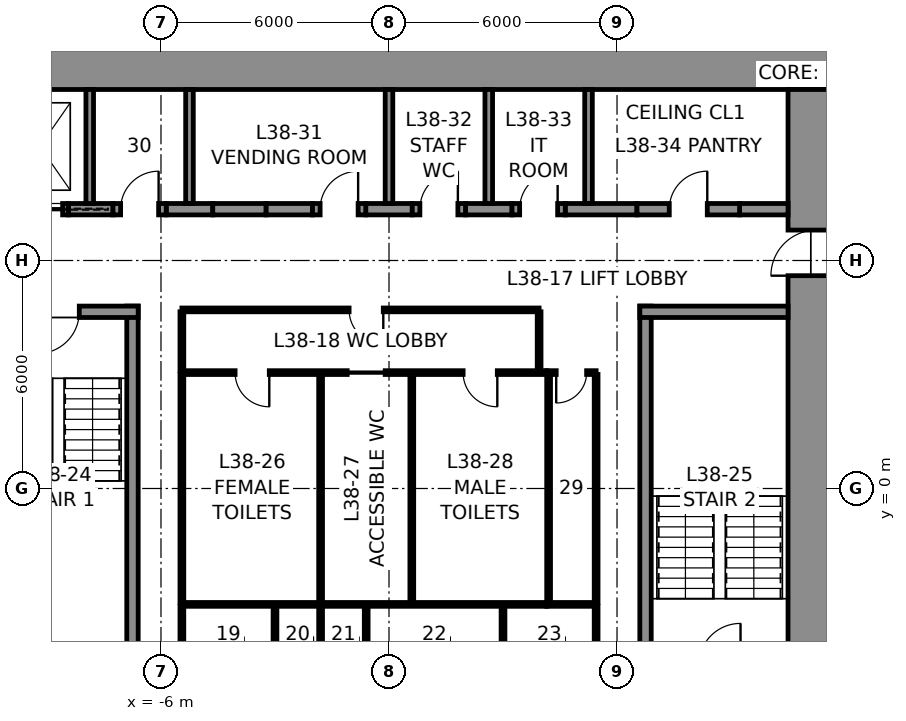
"""IFC4 building model, lengths in metres.
Left out: names, types, materials, properties, quantities, classifications, styles, units other than length and angle.
Written with IfcOpenShell. Run it as: python <this file> out.ifc"""

import sys

from ifc_helpers import new_model, si_unit, direction, frame, frame_2d, origin, place, context, subcontext, project, spatial, rectangle, extrude, element, fill, save


model = new_model("IFC4")
c1 = context("Model", 3, precision=1e-05, world=origin(), true_north=direction((0.0, 1.0)))
c2 = subcontext(c1, "Body", "Model", "MODEL_VIEW")
j1 = project(units=[si_unit("LENGTHUNIT", "METRE"), si_unit("PLANEANGLEUNIT", "RADIAN")], contexts=[c1])
p1 = place(None, origin())
s1 = spatial("IfcSite", under=j1, at=p1, CompositionType="ELEMENT")
p2 = place(p1, origin())
s2 = spatial("IfcBuilding", under=s1, at=p2, CompositionType="ELEMENT")
p3 = place(p2, frame((0.0, 0.0, 179.8)))
s3 = spatial("IfcBuildingStorey", under=s2, at=p3, CompositionType="ELEMENT", Elevation=179.8)
p4 = place(p3, frame((-12.0, 11.25, 0.0), z_axis=(0.0, 0.0, 1.0), x_axis=(1.0, 0.0, 0.0)))
e1 = element("IfcWall", 1, at=p4, inside=s3, PredefinedType="SHEAR", context=c2, shape_type="SweptSolid", body=[
    extrude(rectangle(XDim=24.0, YDim=1.5, at=frame_2d((12.0, 0.0))), origin(), (0.0, 0.0, 1.0), 4.0),
])
p5 = place(p3, frame((11.25, 10.5, 0.0), z_axis=(0.0, 0.0, 1.0), x_axis=(0.0, -1.0, 0.0)))
e2 = element("IfcWall", 2, at=p5, inside=s3, PredefinedType="SHEAR", context=c2, shape_type="SweptSolid", body=[
    extrude(rectangle(XDim=21.0, YDim=1.5, at=frame_2d((10.5, 0.0))), origin(), (0.0, 0.0, 1.0), 4.0),
])
p6 = place(p5, frame((3.7, 0.0, 0.0)))
e3 = element("IfcOpeningElement", 3, at=p6, cuts=e2, PredefinedType="OPENING", context=c2, shape_type="SweptSolid", body=[
    extrude(rectangle(XDim=1.2, YDim=2.3, at=frame_2d((0.6, 1.15))), frame((0.0, 0.76, 0.0), z_axis=(0.0, -1.0, 0.0), x_axis=(1.0, 0.0, 0.0)), (0.0, 0.0, 1.0), 1.52),
])
p7 = place(p5, frame((16.1, 0.0, 0.0)))
e4 = element("IfcOpeningElement", 4, at=p7, cuts=e2, PredefinedType="OPENING", context=c2, shape_type="SweptSolid", body=[
    extrude(rectangle(XDim=1.2, YDim=2.3, at=frame_2d((0.6, 1.15))), frame((0.0, 0.76, 0.0), z_axis=(0.0, -1.0, 0.0), x_axis=(1.0, 0.0, 0.0)), (0.0, 0.0, 1.0), 1.52),
])
p8 = place(p3, frame((-8.438, 7.35, 0.0), z_axis=(0.0, 0.0, 1.0), x_axis=(1.0, 0.0, 0.0)))
e5 = element("IfcWall", 5, at=p8, inside=s3, PredefinedType="SHEAR", context=c2, shape_type="SweptSolid", body=[
    extrude(rectangle(XDim=1.175, YDim=0.3, at=frame_2d((0.587, 0.0))), origin(), (0.0, 0.0, 1.0), 4.0),
])
for number, where, z_axis, x_axis in (
    (6, (-5.863, 7.35, 0.0), (0.0, 0.0, 1.0), (1.0, 0.0, 0.0)),
    (7, (-3.238, 7.35, 0.0), (0.0, 0.0, 1.0), (1.0, 0.0, 0.0)),
    (8, (-0.613, 7.35, 0.0), (0.0, 0.0, 1.0), (1.0, 0.0, 0.0)),
    (9, (2.012, 7.35, 0.0), (0.0, 0.0, 1.0), (1.0, 0.0, 0.0)),
):
    element("IfcWall", number, at=place(p3, frame(where, z_axis=z_axis, x_axis=x_axis)), inside=s3, PredefinedType="SHEAR", context=c2, shape_type="SweptSolid", body=[
        extrude(rectangle(XDim=1.225, YDim=0.3, at=frame_2d((0.613, 0.0))), origin(), (0.0, 0.0, 1.0), 4.0),
    ])
p9 = place(p3, frame((4.637, 7.35, 0.0), z_axis=(0.0, 0.0, 1.0), x_axis=(1.0, 0.0, 0.0)))
e10 = element("IfcWall", 10, at=p9, inside=s3, PredefinedType="SHEAR", context=c2, shape_type="SweptSolid", body=[
    extrude(rectangle(XDim=1.887, YDim=0.3, at=frame_2d((0.944, 0.0))), origin(), (0.0, 0.0, 1.0), 4.0),
])
p10 = place(p3, frame((9.225, 7.35, 0.0), z_axis=(0.0, 0.0, 1.0), x_axis=(1.0, 0.0, 0.0)))
e11 = element("IfcWall", 11, at=p10, inside=s3, PredefinedType="SHEAR", context=c2, shape_type="SweptSolid", body=[
    extrude(rectangle(XDim=1.275, YDim=0.3, at=frame_2d((0.637, 0.0))), origin(), (0.0, 0.0, 1.0), 4.0),
])
p11 = place(p3, frame((-9.938, 7.35, 0.0), z_axis=(0.0, 0.0, 1.0), x_axis=(1.0, 0.0, 0.0)))
e12 = element("IfcWall", 12, at=p11, inside=s3, PredefinedType="PARTITIONING", context=c2, shape_type="SweptSolid", body=[
    extrude(rectangle(XDim=1.5, YDim=0.3, at=frame_2d((0.75, 0.0))), origin(), (0.0, 0.0, 1.0), 4.0),
])
p12 = place(p11, frame((0.15, 0.0, 0.0)))
e13 = element("IfcOpeningElement", 13, at=p12, cuts=e12, PredefinedType="OPENING", context=c2, shape_type="SweptSolid", body=[
    extrude(rectangle(XDim=1.2, YDim=2.3, at=frame_2d((0.6, 1.15))), frame((0.0, 0.16, 0.0), z_axis=(0.0, -1.0, 0.0), x_axis=(1.0, 0.0, 0.0)), (0.0, 0.0, 1.0), 0.32),
])
p13 = place(p3, frame((-7.262, 7.35, 0.0), z_axis=(0.0, 0.0, 1.0), x_axis=(1.0, 0.0, 0.0)))
e14 = element("IfcWall", 14, at=p13, inside=s3, PredefinedType="PARTITIONING", context=c2, shape_type="SweptSolid", body=[
    extrude(rectangle(XDim=1.4, YDim=0.3, at=frame_2d((0.7, 0.0))), origin(), (0.0, 0.0, 1.0), 4.0),
])
p14 = place(p13, frame((0.2, 0.0, 0.0)))
e15 = element("IfcOpeningElement", 15, at=p14, cuts=e14, PredefinedType="OPENING", context=c2, shape_type="SweptSolid", body=[
    extrude(rectangle(XDim=1.0, YDim=2.3, at=frame_2d((0.5, 1.15))), frame((0.0, 0.16, 0.0), z_axis=(0.0, -1.0, 0.0), x_axis=(1.0, 0.0, 0.0)), (0.0, 0.0, 1.0), 0.32),
])
p15 = place(p3, frame((-4.637, 7.35, 0.0), z_axis=(0.0, 0.0, 1.0), x_axis=(1.0, 0.0, 0.0)))
e16 = element("IfcWall", 16, at=p15, inside=s3, PredefinedType="PARTITIONING", context=c2, shape_type="SweptSolid", body=[
    extrude(rectangle(XDim=1.4, YDim=0.3, at=frame_2d((0.7, 0.0))), origin(), (0.0, 0.0, 1.0), 4.0),
])
p16 = place(p3, frame((-2.012, 7.35, 0.0), z_axis=(0.0, 0.0, 1.0), x_axis=(1.0, 0.0, 0.0)))
e17 = element("IfcWall", 17, at=p16, inside=s3, PredefinedType="PARTITIONING", context=c2, shape_type="SweptSolid", body=[
    extrude(rectangle(XDim=1.4, YDim=0.3, at=frame_2d((0.7, 0.0))), origin(), (0.0, 0.0, 1.0), 4.0),
])
p17 = place(p16, frame((0.2, 0.0, 0.0)))
e18 = element("IfcOpeningElement", 18, at=p17, cuts=e17, PredefinedType="OPENING", context=c2, shape_type="SweptSolid", body=[
    extrude(rectangle(XDim=1.0, YDim=2.3, at=frame_2d((0.5, 1.15))), frame((0.0, 0.16, 0.0), z_axis=(0.0, -1.0, 0.0), x_axis=(1.0, 0.0, 0.0)), (0.0, 0.0, 1.0), 0.32),
])
p18 = place(p3, frame((0.613, 7.35, 0.0), z_axis=(0.0, 0.0, 1.0), x_axis=(1.0, 0.0, 0.0)))
e19 = element("IfcWall", 19, at=p18, inside=s3, PredefinedType="PARTITIONING", context=c2, shape_type="SweptSolid", body=[
    extrude(rectangle(XDim=1.4, YDim=0.3, at=frame_2d((0.7, 0.0))), origin(), (0.0, 0.0, 1.0), 4.0),
])
p19 = place(p18, frame((0.2, 0.0, 0.0)))
e20 = element("IfcOpeningElement", 20, at=p19, cuts=e19, PredefinedType="OPENING", context=c2, shape_type="SweptSolid", body=[
    extrude(rectangle(XDim=1.0, YDim=2.3, at=frame_2d((0.5, 1.15))), frame((0.0, 0.16, 0.0), z_axis=(0.0, -1.0, 0.0), x_axis=(1.0, 0.0, 0.0)), (0.0, 0.0, 1.0), 0.32),
])
p20 = place(p3, frame((3.238, 7.35, 0.0), z_axis=(0.0, 0.0, 1.0), x_axis=(1.0, 0.0, 0.0)))
e21 = element("IfcWall", 21, at=p20, inside=s3, PredefinedType="PARTITIONING", context=c2, shape_type="SweptSolid", body=[
    extrude(rectangle(XDim=1.4, YDim=0.3, at=frame_2d((0.7, 0.0))), origin(), (0.0, 0.0, 1.0), 4.0),
])
p21 = place(p20, frame((0.2, 0.0, 0.0)))
e22 = element("IfcOpeningElement", 22, at=p21, cuts=e21, PredefinedType="OPENING", context=c2, shape_type="SweptSolid", body=[
    extrude(rectangle(XDim=1.0, YDim=2.3, at=frame_2d((0.5, 1.15))), frame((0.0, 0.16, 0.0), z_axis=(0.0, -1.0, 0.0), x_axis=(1.0, 0.0, 0.0)), (0.0, 0.0, 1.0), 0.32),
])
p22 = place(p3, frame((6.525, 7.35, 0.0), z_axis=(0.0, 0.0, 1.0), x_axis=(1.0, 0.0, 0.0)))
e23 = element("IfcWall", 23, at=p22, inside=s3, PredefinedType="PARTITIONING", context=c2, shape_type="SweptSolid", body=[
    extrude(rectangle(XDim=2.7, YDim=0.3, at=frame_2d((1.35, 0.0))), origin(), (0.0, 0.0, 1.0), 4.0),
])
p23 = place(p22, frame((0.85, 0.0, 0.0)))
e24 = element("IfcOpeningElement", 24, at=p23, cuts=e23, PredefinedType="OPENING", context=c2, shape_type="SweptSolid", body=[
    extrude(rectangle(XDim=1.0, YDim=2.3, at=frame_2d((0.5, 1.15))), frame((0.0, 0.16, 0.0), z_axis=(0.0, -1.0, 0.0), x_axis=(1.0, 0.0, 0.0)), (0.0, 0.0, 1.0), 0.32),
])
for number, where, z_axis, x_axis in (
    (25, (-7.875, 7.5, 0.0), (0.0, 0.0, 1.0), (0.0, 1.0, 0.0)),
    (26, (-5.25, 7.5, 0.0), (0.0, 0.0, 1.0), (0.0, 1.0, 0.0)),
    (27, (0.0, 7.5, 0.0), (0.0, 0.0, 1.0), (0.0, 1.0, 0.0)),
    (28, (2.625, 7.5, 0.0), (0.0, 0.0, 1.0), (0.0, 1.0, 0.0)),
    (29, (5.25, 7.5, 0.0), (0.0, 0.0, 1.0), (0.0, 1.0, 0.0)),
):
    element("IfcWall", number, at=place(p3, frame(where, z_axis=z_axis, x_axis=x_axis)), inside=s3, PredefinedType="PARTITIONING", context=c2, shape_type="SweptSolid", body=[
        extrude(rectangle(XDim=3.0, YDim=0.2, at=frame_2d((1.5, 0.0))), origin(), (0.0, 0.0, 1.0), 4.0),
    ])
p24 = place(p3, frame((-6.75, -4.8, 0.0), z_axis=(0.0, 0.0, 1.0), x_axis=(0.0, 1.0, 0.0)))
e30 = element("IfcWall", 30, at=p24, inside=s3, PredefinedType="SOLIDWALL", context=c2, shape_type="SweptSolid", body=[
    extrude(rectangle(XDim=9.6, YDim=0.3, at=frame_2d((4.8, 0.0))), origin(), (0.0, 0.0, 1.0), 3.75),
])
p25 = place(p3, frame((-10.5, 4.65, 0.0), z_axis=(0.0, 0.0, 1.0), x_axis=(1.0, 0.0, 0.0)))
e31 = element("IfcWall", 31, at=p25, inside=s3, PredefinedType="SOLIDWALL", context=c2, shape_type="SweptSolid", body=[
    extrude(rectangle(XDim=3.9, YDim=0.3, at=frame_2d((1.95, 0.0))), origin(), (0.0, 0.0, 1.0), 3.75),
])
p26 = place(p25, frame((1.25, 0.0, 0.0)))
e32 = element("IfcOpeningElement", 32, at=p26, cuts=e31, PredefinedType="OPENING", context=c2, shape_type="SweptSolid", body=[
    extrude(rectangle(XDim=1.1, YDim=2.3, at=frame_2d((0.55, 1.15))), frame((0.0, 0.16, 0.0), z_axis=(0.0, -1.0, 0.0), x_axis=(1.0, 0.0, 0.0)), (0.0, 0.0, 1.0), 0.32),
])
p27 = place(p3, frame((6.75, -4.8, 0.0), z_axis=(0.0, 0.0, 1.0), x_axis=(0.0, 1.0, 0.0)))
e33 = element("IfcWall", 33, at=p27, inside=s3, PredefinedType="SOLIDWALL", context=c2, shape_type="SweptSolid", body=[
    extrude(rectangle(XDim=9.6, YDim=0.3, at=frame_2d((4.8, 0.0))), origin(), (0.0, 0.0, 1.0), 3.75),
])
p28 = place(p3, frame((6.6, 4.65, 0.0), z_axis=(0.0, 0.0, 1.0), x_axis=(1.0, 0.0, 0.0)))
e34 = element("IfcWall", 34, at=p28, inside=s3, PredefinedType="SOLIDWALL", context=c2, shape_type="SweptSolid", body=[
    extrude(rectangle(XDim=3.9, YDim=0.3, at=frame_2d((1.95, 0.0))), origin(), (0.0, 0.0, 1.0), 3.75),
])
p29 = place(p3, frame((-5.45, 3.05, 0.0), z_axis=(0.0, 0.0, 1.0), x_axis=(1.0, 0.0, 0.0)))
e35 = element("IfcWall", 35, at=p29, inside=s3, PredefinedType="PARTITIONING", context=c2, shape_type="SweptSolid", body=[
    extrude(rectangle(XDim=9.6, YDim=0.1, at=frame_2d((4.8, 0.0))), origin(), (0.0, 0.0, 1.0), 3.75),
])
p30 = place(p29, frame((1.4, 0.0, 0.0)))
e36 = element("IfcOpeningElement", 36, at=p30, cuts=e35, PredefinedType="OPENING", context=c2, shape_type="SweptSolid", body=[
    extrude(rectangle(XDim=0.9, YDim=2.3, at=frame_2d((0.45, 1.15))), frame((0.0, 0.06, 0.0), z_axis=(0.0, -1.0, 0.0), x_axis=(1.0, 0.0, 0.0)), (0.0, 0.0, 1.0), 0.12),
])
p31 = place(p29, frame((4.35, 0.0, 0.0)))
e37 = element("IfcOpeningElement", 37, at=p31, cuts=e35, PredefinedType="OPENING", context=c2, shape_type="SweptSolid", body=[
    extrude(rectangle(XDim=1.0, YDim=2.3, at=frame_2d((0.5, 1.15))), frame((0.0, 0.06, 0.0), z_axis=(0.0, -1.0, 0.0), x_axis=(1.0, 0.0, 0.0)), (0.0, 0.0, 1.0), 0.12),
])
p32 = place(p29, frame((7.4, 0.0, 0.0)))
e38 = element("IfcOpeningElement", 38, at=p32, cuts=e35, PredefinedType="OPENING", context=c2, shape_type="SweptSolid", body=[
    extrude(rectangle(XDim=0.9, YDim=2.3, at=frame_2d((0.45, 1.15))), frame((0.0, 0.06, 0.0), z_axis=(0.0, -1.0, 0.0), x_axis=(1.0, 0.0, 0.0)), (0.0, 0.0, 1.0), 0.12),
])
p33 = place(p3, frame((4.15, 3.05, 0.0), z_axis=(0.0, 0.0, 1.0), x_axis=(1.0, 0.0, 0.0)))
e39 = element("IfcWall", 39, at=p33, inside=s3, PredefinedType="PARTITIONING", context=c2, shape_type="SweptSolid", body=[
    extrude(rectangle(XDim=1.3, YDim=0.1, at=frame_2d((0.65, 0.0))), origin(), (0.0, 0.0, 1.0), 3.75),
])
p34 = place(p33, frame((0.25, 0.0, 0.0)))
e40 = element("IfcOpeningElement", 40, at=p34, cuts=e39, PredefinedType="OPENING", context=c2, shape_type="SweptSolid", body=[
    extrude(rectangle(XDim=0.8, YDim=2.3, at=frame_2d((0.4, 1.15))), frame((0.0, 0.06, 0.0), z_axis=(0.0, -1.0, 0.0), x_axis=(1.0, 0.0, 0.0)), (0.0, 0.0, 1.0), 0.12),
])
p35 = place(p3, frame((4.15, -3.05, 0.0), z_axis=(0.0, 0.0, 1.0), x_axis=(-1.0, 0.0, 0.0)))
e41 = element("IfcWall", 41, at=p35, inside=s3, PredefinedType="PARTITIONING", context=c2, shape_type="SweptSolid", body=[
    extrude(rectangle(XDim=9.6, YDim=0.1, at=frame_2d((4.8, 0.0))), origin(), (0.0, 0.0, 1.0), 3.75),
])
p36 = place(p3, frame((5.45, -3.05, 0.0), z_axis=(0.0, 0.0, 1.0), x_axis=(-1.0, 0.0, 0.0)))
e42 = element("IfcWall", 42, at=p36, inside=s3, PredefinedType="PARTITIONING", context=c2, shape_type="SweptSolid", body=[
    extrude(rectangle(XDim=1.3, YDim=0.1, at=frame_2d((0.65, 0.0))), origin(), (0.0, 0.0, 1.0), 3.75),
])
for number, where, z_axis, x_axis in (
    (43, (5.45, 3.0, 0.0), (0.0, 0.0, 1.0), (0.0, -1.0, 0.0)),
    (44, (-5.45, -3.0, 0.0), (0.0, 0.0, 1.0), (0.0, 1.0, 0.0)),
    (45, (-1.8, -3.0, 0.0), (0.0, 0.0, 1.0), (0.0, 1.0, 0.0)),
    (46, (0.6, -3.0, 0.0), (0.0, 0.0, 1.0), (0.0, 1.0, 0.0)),
    (47, (4.2, -3.0, 0.0), (0.0, 0.0, 1.0), (0.0, 1.0, 0.0)),
):
    element("IfcWall", number, at=place(p3, frame(where, z_axis=z_axis, x_axis=x_axis)), inside=s3, PredefinedType="PARTITIONING", context=c2, shape_type="SweptSolid", body=[
        extrude(rectangle(XDim=6.0, YDim=0.1, at=frame_2d((3.0, 0.0))), origin(), (0.0, 0.0, 1.0), 3.75),
    ])
p37 = place(p3, frame((-5.45, 4.7, 0.0), z_axis=(0.0, 0.0, 1.0), x_axis=(1.0, 0.0, 0.0)))
e48 = element("IfcWall", 48, at=p37, inside=s3, PredefinedType="PARTITIONING", context=c2, shape_type="SweptSolid", body=[
    extrude(rectangle(XDim=9.4, YDim=0.1, at=frame_2d((4.7, 0.0))), origin(), (0.0, 0.0, 1.0), 3.75),
])
p38 = place(p37, frame((4.4, 0.0, 0.0)))
e49 = element("IfcOpeningElement", 49, at=p38, cuts=e48, PredefinedType="OPENING", context=c2, shape_type="SweptSolid", body=[
    extrude(rectangle(XDim=0.9, YDim=2.3, at=frame_2d((0.45, 1.15))), frame((0.0, 0.06, 0.0), z_axis=(0.0, -1.0, 0.0), x_axis=(1.0, 0.0, 0.0)), (0.0, 0.0, 1.0), 0.12),
])
for number, where, z_axis, x_axis in (
    (50, (-5.45, 3.1, 0.0), (0.0, 0.0, 1.0), (0.0, 1.0, 0.0)),
    (51, (3.95, 3.1, 0.0), (0.0, 0.0, 1.0), (0.0, 1.0, 0.0)),
    (52, (-5.45, -3.1, 0.0), (0.0, 0.0, 1.0), (0.0, -1.0, 0.0)),
    (53, (5.45, -3.1, 0.0), (0.0, 0.0, 1.0), (0.0, -1.0, 0.0)),
    (54, (-3.0, -3.1, 0.0), (0.0, 0.0, 1.0), (0.0, -1.0, 0.0)),
    (55, (-1.8, -3.1, 0.0), (0.0, 0.0, 1.0), (0.0, -1.0, 0.0)),
    (56, (-0.6, -3.1, 0.0), (0.0, 0.0, 1.0), (0.0, -1.0, 0.0)),
    (57, (3.0, -3.1, 0.0), (0.0, 0.0, 1.0), (0.0, -1.0, 0.0)),
):
    element("IfcWall", number, at=place(p3, frame(where, z_axis=z_axis, x_axis=x_axis)), inside=s3, PredefinedType="PARTITIONING", context=c2, shape_type="SweptSolid", body=[
        extrude(rectangle(XDim=1.55, YDim=0.1, at=frame_2d((0.775, 0.0))), origin(), (0.0, 0.0, 1.0), 3.75),
    ])
p39 = place(p26, frame((1.1, 0.0, 0.0), z_axis=(0.0, 0.0, 1.0), x_axis=(-1.0, 0.0, 0.0)))
e58 = element("IfcDoor", 58, at=p39, inside=s3, OperationType="SINGLE_SWING_RIGHT", PredefinedType="DOOR", context=c2, shape_type="SweptSolid", body=[
    extrude(rectangle(XDim=1.1, YDim=2.3, at=frame_2d((0.55, 1.15))), frame((0.0, 0.025, 0.0), z_axis=(0.0, -1.0, 0.0), x_axis=(1.0, 0.0, 0.0)), (0.0, 0.0, 1.0), 0.05),
])
fill(e32, e58)
p40 = place(p30, frame((0.9, 0.0, 0.0), z_axis=(0.0, 0.0, 1.0), x_axis=(-1.0, 0.0, 0.0)))
e59 = element("IfcDoor", 59, at=p40, inside=s3, OperationType="SINGLE_SWING_LEFT", PredefinedType="DOOR", context=c2, shape_type="SweptSolid", body=[
    extrude(rectangle(XDim=0.9, YDim=2.3, at=frame_2d((0.45, 1.15))), frame((0.0, 0.025, 0.0), z_axis=(0.0, -1.0, 0.0), x_axis=(1.0, 0.0, 0.0)), (0.0, 0.0, 1.0), 0.05),
])
fill(e36, e59)
p41 = place(p31, frame((1.0, 0.0, 0.0), z_axis=(0.0, 0.0, 1.0), x_axis=(-1.0, 0.0, 0.0)))
e60 = element("IfcDoor", 60, at=p41, inside=s3, OperationType="SLIDING_TO_LEFT", PredefinedType="DOOR", context=c2, shape_type="SweptSolid", body=[
    extrude(rectangle(XDim=1.0, YDim=2.3, at=frame_2d((0.5, 1.15))), frame((0.0, 0.025, 0.0), z_axis=(0.0, -1.0, 0.0), x_axis=(1.0, 0.0, 0.0)), (0.0, 0.0, 1.0), 0.05),
])
fill(e37, e60)
p42 = place(p32, frame((0.9, 0.0, 0.0), z_axis=(0.0, 0.0, 1.0), x_axis=(-1.0, 0.0, 0.0)))
e61 = element("IfcDoor", 61, at=p42, inside=s3, OperationType="SINGLE_SWING_LEFT", PredefinedType="DOOR", context=c2, shape_type="SweptSolid", body=[
    extrude(rectangle(XDim=0.9, YDim=2.3, at=frame_2d((0.45, 1.15))), frame((0.0, 0.025, 0.0), z_axis=(0.0, -1.0, 0.0), x_axis=(1.0, 0.0, 0.0)), (0.0, 0.0, 1.0), 0.05),
])
fill(e38, e61)
p43 = place(p34, frame((0.8, 0.0, 0.0), z_axis=(0.0, 0.0, 1.0), x_axis=(-1.0, 0.0, 0.0)))
e62 = element("IfcDoor", 62, at=p43, inside=s3, OperationType="SINGLE_SWING_RIGHT", PredefinedType="DOOR", context=c2, shape_type="SweptSolid", body=[
    extrude(rectangle(XDim=0.8, YDim=2.3, at=frame_2d((0.4, 1.15))), frame((0.0, 0.025, 0.0), z_axis=(0.0, -1.0, 0.0), x_axis=(1.0, 0.0, 0.0)), (0.0, 0.0, 1.0), 0.05),
])
fill(e40, e62)
p44 = place(p38, frame((0.9, 0.0, 0.0), z_axis=(0.0, 0.0, 1.0), x_axis=(-1.0, 0.0, 0.0)))
e63 = element("IfcDoor", 63, at=p44, inside=s3, OperationType="SINGLE_SWING_LEFT", PredefinedType="DOOR", context=c2, shape_type="SweptSolid", body=[
    extrude(rectangle(XDim=0.9, YDim=2.3, at=frame_2d((0.45, 1.15))), frame((0.0, 0.025, 0.0), z_axis=(0.0, -1.0, 0.0), x_axis=(1.0, 0.0, 0.0)), (0.0, 0.0, 1.0), 0.05),
])
fill(e49, e63)
p45 = place(p14, origin())
e64 = element("IfcDoor", 64, at=p45, inside=s3, OperationType="SINGLE_SWING_RIGHT", PredefinedType="DOOR", context=c2, shape_type="SweptSolid", body=[
    extrude(rectangle(XDim=1.0, YDim=2.3, at=frame_2d((0.5, 1.15))), frame((0.0, 0.025, 0.0), z_axis=(0.0, -1.0, 0.0), x_axis=(1.0, 0.0, 0.0)), (0.0, 0.0, 1.0), 0.05),
])
fill(e15, e64)
p46 = place(p17, origin())
e65 = element("IfcDoor", 65, at=p46, inside=s3, OperationType="SINGLE_SWING_RIGHT", PredefinedType="DOOR", context=c2, shape_type="SweptSolid", body=[
    extrude(rectangle(XDim=1.0, YDim=2.3, at=frame_2d((0.5, 1.15))), frame((0.0, 0.025, 0.0), z_axis=(0.0, -1.0, 0.0), x_axis=(1.0, 0.0, 0.0)), (0.0, 0.0, 1.0), 0.05),
])
fill(e18, e65)
p47 = place(p19, origin())
e66 = element("IfcDoor", 66, at=p47, inside=s3, OperationType="SINGLE_SWING_RIGHT", PredefinedType="DOOR", context=c2, shape_type="SweptSolid", body=[
    extrude(rectangle(XDim=1.0, YDim=2.3, at=frame_2d((0.5, 1.15))), frame((0.0, 0.025, 0.0), z_axis=(0.0, -1.0, 0.0), x_axis=(1.0, 0.0, 0.0)), (0.0, 0.0, 1.0), 0.05),
])
fill(e20, e66)
p48 = place(p21, origin())
e67 = element("IfcDoor", 67, at=p48, inside=s3, OperationType="SINGLE_SWING_RIGHT", PredefinedType="DOOR", context=c2, shape_type="SweptSolid", body=[
    extrude(rectangle(XDim=1.0, YDim=2.3, at=frame_2d((0.5, 1.15))), frame((0.0, 0.025, 0.0), z_axis=(0.0, -1.0, 0.0), x_axis=(1.0, 0.0, 0.0)), (0.0, 0.0, 1.0), 0.05),
])
fill(e22, e67)
p49 = place(p23, origin())
e68 = element("IfcDoor", 68, at=p49, inside=s3, OperationType="SINGLE_SWING_RIGHT", PredefinedType="DOOR", context=c2, shape_type="SweptSolid", body=[
    extrude(rectangle(XDim=1.0, YDim=2.3, at=frame_2d((0.5, 1.15))), frame((0.0, 0.025, 0.0), z_axis=(0.0, -1.0, 0.0), x_axis=(1.0, 0.0, 0.0)), (0.0, 0.0, 1.0), 0.05),
])
fill(e24, e68)
p50 = place(p6, frame((1.2, 0.0, 0.0), z_axis=(0.0, 0.0, 1.0), x_axis=(-1.0, 0.0, 0.0)))
e69 = element("IfcDoor", 69, at=p50, inside=s3, OperationType="SINGLE_SWING_LEFT", PredefinedType="DOOR", context=c2, shape_type="SweptSolid", body=[
    extrude(rectangle(XDim=1.2, YDim=2.3, at=frame_2d((0.6, 1.15))), frame((0.0, 0.025, 0.0), z_axis=(0.0, -1.0, 0.0), x_axis=(1.0, 0.0, 0.0)), (0.0, 0.0, 1.0), 0.05),
])
fill(e3, e69)
p51 = place(p12, frame((1.2, 0.0, 0.0), z_axis=(0.0, 0.0, 1.0), x_axis=(-1.0, 0.0, 0.0)))
e70 = element("IfcDoor", 70, at=p51, inside=s3, OperationType="SLIDING_TO_LEFT", PredefinedType="DOOR", context=c2, shape_type="SweptSolid", body=[
    extrude(rectangle(XDim=1.2, YDim=2.3, at=frame_2d((0.6, 1.15))), frame((0.0, 0.025, 0.0), z_axis=(0.0, -1.0, 0.0), x_axis=(1.0, 0.0, 0.0)), (0.0, 0.0, 1.0), 0.05),
])
fill(e13, e70)
save(model, sys.argv[1])
